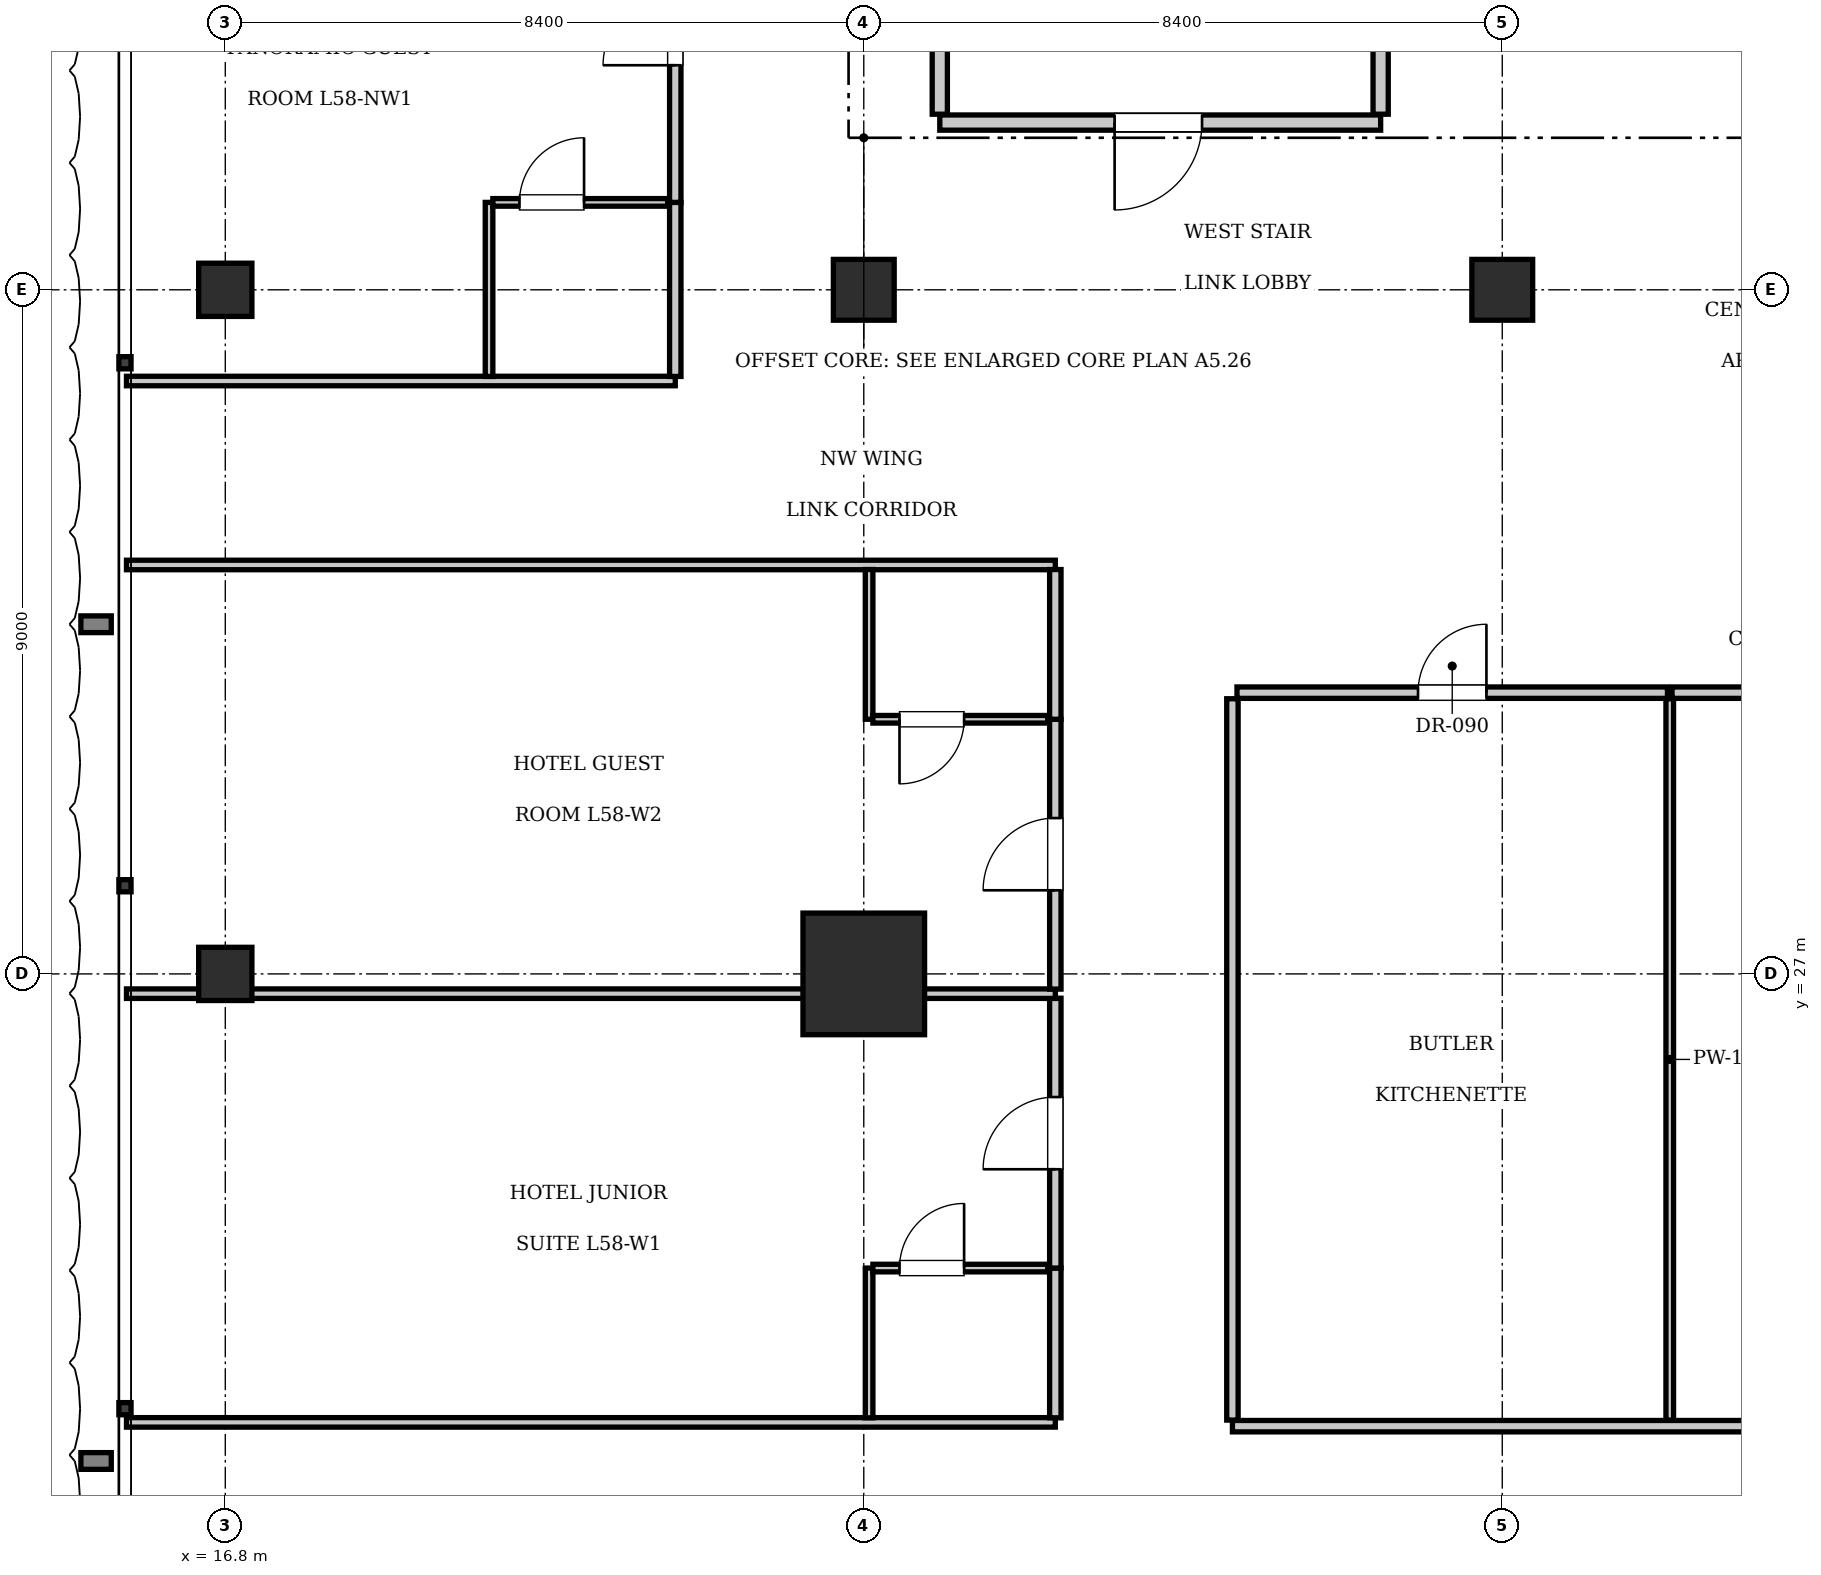
"""IFC4 building model, lengths in metres.
Left out: names, types, materials, properties, quantities, classifications, styles, units other than length and angle.
Written with IfcOpenShell. Run it as: python <this file> out.ifc"""

import sys

from ifc_helpers import new_model, si_unit, direction, frame, frame_2d, origin, origin_2d, place, context, subcontext, project, spatial, rectangle, extrude, element, fill, save


model = new_model("IFC4")
c1 = context("Model", 3, precision=1e-05, world=origin(), true_north=direction((0.0, 1.0)))
c2 = subcontext(c1, "Body", "Model", "MODEL_VIEW")
j1 = project(units=[si_unit("LENGTHUNIT", "METRE"), si_unit("PLANEANGLEUNIT", "RADIAN")], contexts=[c1])
p1 = place(None, origin())
s1 = spatial("IfcSite", under=j1, at=p1, CompositionType="ELEMENT")
p2 = place(p1, origin())
s2 = spatial("IfcBuilding", under=s1, at=p2, CompositionType="ELEMENT")
p3 = place(p2, frame((0.0, 0.0, 239.4)))
s3 = spatial("IfcBuildingStorey", under=s2, at=p3, CompositionType="ELEMENT", Elevation=239.4)
p4 = place(p3, frame((25.2, 27.0, 0.0), z_axis=(0.0, 0.0, 1.0), x_axis=(1.0, 0.0, 0.0)))
e1 = element("IfcColumn", 1, at=p4, inside=s3, PredefinedType="COLUMN", context=c2, shape_type="SweptSolid", body=[
    extrude(rectangle(XDim=1.6, YDim=1.6, at=origin_2d()), origin(), (0.0, 0.0, 1.0), 3.85),
])
for number, where, z_axis, x_axis in (
    (2, (25.2, 36.0, 0.0), (0.0, 0.0, 1.0), (1.0, 0.0, 0.0)),
    (3, (33.6, 36.0, 0.0), (0.0, 0.0, 1.0), (1.0, 0.0, 0.0)),
):
    element("IfcColumn", number, at=place(p3, frame(where, z_axis=z_axis, x_axis=x_axis)), inside=s3, PredefinedType="COLUMN", context=c2, shape_type="SweptSolid", body=[
        extrude(rectangle(XDim=0.8, YDim=0.8, at=origin_2d()), origin(), (0.0, 0.0, 1.0), 3.85),
    ])
for number, where, z_axis, x_axis in (
    (4, (16.8, 27.0, 0.0), (0.0, 0.0, 1.0), (1.0, 0.0, 0.0)),
    (5, (16.8, 36.0, 0.0), (0.0, 0.0, 1.0), (1.0, 0.0, 0.0)),
):
    element("IfcColumn", number, at=place(p3, frame(where, z_axis=z_axis, x_axis=x_axis)), inside=s3, PredefinedType="COLUMN", context=c2, shape_type="SweptSolid", body=[
        extrude(rectangle(XDim=0.7, YDim=0.7, at=origin_2d()), origin(), (0.0, 0.0, 1.0), 3.85),
    ])
p5 = place(p3, frame((26.2, 38.2, 0.0), z_axis=(0.0, 0.0, 1.0), x_axis=(1.0, 0.0, 0.0)))
e6 = element("IfcWall", 6, at=p5, inside=s3, PredefinedType="PARTITIONING", context=c2, shape_type="SweptSolid", body=[
    extrude(rectangle(XDim=5.8, YDim=0.2, at=frame_2d((2.9, 0.0))), origin(), (0.0, 0.0, 1.0), 3.61),
])
p6 = place(p5, frame((2.3, 0.0, 0.0)))
e7 = element("IfcOpeningElement", 7, at=p6, cuts=e6, PredefinedType="OPENING", context=c2, shape_type="SweptSolid", body=[
    extrude(rectangle(XDim=1.15, YDim=2.15, at=frame_2d((0.575, 1.075))), frame((0.0, 0.11, 0.0), z_axis=(0.0, -1.0, 0.0), x_axis=(1.0, 0.0, 0.0)), (0.0, 0.0, 1.0), 0.22),
])
for number, where, z_axis, x_axis in (
    (8, (26.2, 38.31, 0.0), (0.0, 0.0, 1.0), (0.0, 1.0, 0.0)),
    (9, (32.0, 38.31, 0.0), (0.0, 0.0, 1.0), (0.0, 1.0, 0.0)),
):
    element("IfcWall", number, at=place(p3, frame(where, z_axis=z_axis, x_axis=x_axis)), inside=s3, PredefinedType="PARTITIONING", context=c2, shape_type="SweptSolid", body=[
        extrude(rectangle(XDim=3.07, YDim=0.2, at=frame_2d((1.535, 0.0))), origin(), (0.0, 0.0, 1.0), 3.61),
    ])
p7 = place(p3, frame((30.05, 21.05, 0.0), z_axis=(0.0, 0.0, 1.0), x_axis=(1.0, 0.0, 0.0)))
e10 = element("IfcWall", 10, at=p7, inside=s3, PredefinedType="PARTITIONING", context=c2, shape_type="SweptSolid", body=[
    extrude(rectangle(XDim=15.55, YDim=0.15, at=frame_2d((7.775, 0.0))), origin(), (0.0, 0.0, 1.0), 3.61),
])
p8 = place(p3, frame((30.05, 21.13, 0.0), z_axis=(0.0, 0.0, 1.0), x_axis=(0.0, 1.0, 0.0)))
e11 = element("IfcWall", 11, at=p8, inside=s3, PredefinedType="PARTITIONING", context=c2, shape_type="SweptSolid", body=[
    extrude(rectangle(XDim=9.49, YDim=0.15, at=frame_2d((4.745, 0.0))), origin(), (0.0, 0.0, 1.0), 3.61),
])
p9 = place(p3, frame((30.11, 30.7, 0.0), z_axis=(0.0, 0.0, 1.0), x_axis=(1.0, 0.0, 0.0)))
e12 = element("IfcWall", 12, at=p9, inside=s3, PredefinedType="PARTITIONING", context=c2, shape_type="SweptSolid", body=[
    extrude(rectangle(XDim=5.663, YDim=0.15, at=frame_2d((2.832, 0.0))), origin(), (0.0, 0.0, 1.0), 3.61),
])
p10 = place(p9, frame((2.382, 0.0, 0.0)))
e13 = element("IfcOpeningElement", 13, at=p10, cuts=e12, PredefinedType="OPENING", context=c2, shape_type="SweptSolid", body=[
    extrude(rectangle(XDim=0.9, YDim=2.1, at=frame_2d((0.45, 1.05))), frame((0.0, 0.085, 0.0), z_axis=(0.0, -1.0, 0.0), x_axis=(1.0, 0.0, 0.0)), (0.0, 0.0, 1.0), 0.17),
])
p11 = place(p3, frame((35.803, 21.13, 0.0), z_axis=(0.0, 0.0, 1.0), x_axis=(0.0, 1.0, 0.0)))
e14 = element("IfcWall", 14, at=p11, inside=s3, PredefinedType="PARTITIONING", context=c2, shape_type="SweptSolid", body=[
    extrude(rectangle(XDim=9.49, YDim=0.1, at=frame_2d((4.745, 0.0))), origin(), (0.0, 0.0, 1.0), 3.61),
])
p12 = place(p3, frame((35.833, 30.7, 0.0), z_axis=(0.0, 0.0, 1.0), x_axis=(1.0, 0.0, 0.0)))
e15 = element("IfcWall", 15, at=p12, inside=s3, PredefinedType="PARTITIONING", context=c2, shape_type="SweptSolid", body=[
    extrude(rectangle(XDim=9.707, YDim=0.15, at=frame_2d((4.853, 0.0))), origin(), (0.0, 0.0, 1.0), 3.61),
])
p13 = place(p12, frame((4.403, 0.0, 0.0)))
e16 = element("IfcOpeningElement", 16, at=p13, cuts=e15, PredefinedType="OPENING", context=c2, shape_type="SweptSolid", body=[
    extrude(rectangle(XDim=0.9, YDim=2.1, at=frame_2d((0.45, 1.05))), frame((0.0, 0.085, 0.0), z_axis=(0.0, -1.0, 0.0), x_axis=(1.0, 0.0, 0.0)), (0.0, 0.0, 1.0), 0.17),
])
for number, where, z_axis, x_axis in (
    (17, (15.5, 21.1, 0.0), (0.0, 0.0, 1.0), (1.0, 0.0, 0.0)),
    (18, (15.5, 32.38, 0.0), (0.0, 0.0, 1.0), (1.0, 0.0, 0.0)),
):
    element("IfcWall", number, at=place(p3, frame(where, z_axis=z_axis, x_axis=x_axis)), inside=s3, PredefinedType="PARTITIONING", context=c2, shape_type="SweptSolid", body=[
        extrude(rectangle(XDim=12.22, YDim=0.125, at=frame_2d((6.11, 0.0))), origin(), (0.0, 0.0, 1.0), 3.61),
    ])
p14 = place(p3, frame((27.72, 21.16, 0.0), z_axis=(0.0, 0.0, 1.0), x_axis=(0.0, 1.0, 0.0)))
e19 = element("IfcWall", 19, at=p14, inside=s3, PredefinedType="PARTITIONING", context=c2, shape_type="SweptSolid", body=[
    extrude(rectangle(XDim=1.97, YDim=0.15, at=frame_2d((0.985, 0.0))), origin(), (0.0, 0.0, 1.0), 3.61),
])
p15 = place(p3, frame((27.72, 23.13, 0.0), z_axis=(0.0, 0.0, 1.0), x_axis=(0.0, 1.0, 0.0)))
e20 = element("IfcWall", 20, at=p15, inside=s3, PredefinedType="PARTITIONING", context=c2, shape_type="SweptSolid", body=[
    extrude(rectangle(XDim=3.55, YDim=0.15, at=frame_2d((1.775, 0.0))), origin(), (0.0, 0.0, 1.0), 3.61),
])
p16 = place(p15, frame((1.3, 0.0, 0.0)))
e21 = element("IfcOpeningElement", 21, at=p16, cuts=e20, PredefinedType="OPENING", context=c2, shape_type="SweptSolid", body=[
    extrude(rectangle(XDim=0.95, YDim=2.15, at=frame_2d((0.475, 1.075))), frame((0.0, 0.085, 0.0), z_axis=(0.0, -1.0, 0.0), x_axis=(1.0, 0.0, 0.0)), (0.0, 0.0, 1.0), 0.17),
])
p17 = place(p3, frame((25.27, 21.16, 0.0), z_axis=(0.0, 0.0, 1.0), x_axis=(0.0, 1.0, 0.0)))
e22 = element("IfcWall", 22, at=p17, inside=s3, PredefinedType="PARTITIONING", context=c2, shape_type="SweptSolid", body=[
    extrude(rectangle(XDim=1.97, YDim=0.1, at=frame_2d((0.985, 0.0))), origin(), (0.0, 0.0, 1.0), 3.077),
])
p18 = place(p3, frame((25.32, 23.13, 0.0), z_axis=(0.0, 0.0, 1.0), x_axis=(1.0, 0.0, 0.0)))
e23 = element("IfcWall", 23, at=p18, inside=s3, PredefinedType="PARTITIONING", context=c2, shape_type="SweptSolid", body=[
    extrude(rectangle(XDim=2.3, YDim=0.1, at=frame_2d((1.15, 0.0))), origin(), (0.0, 0.0, 1.0), 3.61),
])
p19 = place(p18, frame((0.35, 0.0, 0.0)))
e24 = element("IfcOpeningElement", 24, at=p19, cuts=e23, PredefinedType="OPENING", context=c2, shape_type="SweptSolid", body=[
    extrude(rectangle(XDim=0.85, YDim=2.1, at=frame_2d((0.425, 1.05))), frame((0.0, 0.06, 0.0), z_axis=(0.0, -1.0, 0.0), x_axis=(1.0, 0.0, 0.0)), (0.0, 0.0, 1.0), 0.12),
])
p20 = place(p3, frame((15.5, 26.74, 0.0), z_axis=(0.0, 0.0, 1.0), x_axis=(1.0, 0.0, 0.0)))
e25 = element("IfcWall", 25, at=p20, inside=s3, PredefinedType="PARTITIONING", context=c2, shape_type="SweptSolid", body=[
    extrude(rectangle(XDim=12.22, YDim=0.125, at=frame_2d((6.11, 0.0))), origin(), (0.0, 0.0, 1.0), 2.41),
])
p21 = place(p3, frame((27.72, 26.8, 0.0), z_axis=(0.0, 0.0, 1.0), x_axis=(0.0, 1.0, 0.0)))
e26 = element("IfcWall", 26, at=p21, inside=s3, PredefinedType="PARTITIONING", context=c2, shape_type="SweptSolid", body=[
    extrude(rectangle(XDim=3.55, YDim=0.15, at=frame_2d((1.775, 0.0))), origin(), (0.0, 0.0, 1.0), 3.61),
])
p22 = place(p21, frame((1.3, 0.0, 0.0)))
e27 = element("IfcOpeningElement", 27, at=p22, cuts=e26, PredefinedType="OPENING", context=c2, shape_type="SweptSolid", body=[
    extrude(rectangle(XDim=0.95, YDim=2.15, at=frame_2d((0.475, 1.075))), frame((0.0, 0.085, 0.0), z_axis=(0.0, -1.0, 0.0), x_axis=(1.0, 0.0, 0.0)), (0.0, 0.0, 1.0), 0.17),
])
p23 = place(p3, frame((27.72, 30.35, 0.0), z_axis=(0.0, 0.0, 1.0), x_axis=(0.0, 1.0, 0.0)))
e28 = element("IfcWall", 28, at=p23, inside=s3, PredefinedType="PARTITIONING", context=c2, shape_type="SweptSolid", body=[
    extrude(rectangle(XDim=1.97, YDim=0.15, at=frame_2d((0.985, 0.0))), origin(), (0.0, 0.0, 1.0), 3.61),
])
p24 = place(p3, frame((25.27, 30.35, 0.0), z_axis=(0.0, 0.0, 1.0), x_axis=(0.0, 1.0, 0.0)))
e29 = element("IfcWall", 29, at=p24, inside=s3, PredefinedType="PARTITIONING", context=c2, shape_type="SweptSolid", body=[
    extrude(rectangle(XDim=1.97, YDim=0.1, at=frame_2d((0.985, 0.0))), origin(), (0.0, 0.0, 1.0), 3.077),
])
p25 = place(p3, frame((25.32, 30.35, 0.0), z_axis=(0.0, 0.0, 1.0), x_axis=(1.0, 0.0, 0.0)))
e30 = element("IfcWall", 30, at=p25, inside=s3, PredefinedType="PARTITIONING", context=c2, shape_type="SweptSolid", body=[
    extrude(rectangle(XDim=2.3, YDim=0.1, at=frame_2d((1.15, 0.0))), origin(), (0.0, 0.0, 1.0), 3.61),
])
p26 = place(p25, frame((0.35, 0.0, 0.0)))
e31 = element("IfcOpeningElement", 31, at=p26, cuts=e30, PredefinedType="OPENING", context=c2, shape_type="SweptSolid", body=[
    extrude(rectangle(XDim=0.85, YDim=2.1, at=frame_2d((0.425, 1.05))), frame((0.0, 0.06, 0.0), z_axis=(0.0, -1.0, 0.0), x_axis=(1.0, 0.0, 0.0)), (0.0, 0.0, 1.0), 0.12),
])
p27 = place(p3, frame((15.5, 34.8, 0.0), z_axis=(0.0, 0.0, 1.0), x_axis=(1.0, 0.0, 0.0)))
e32 = element("IfcWall", 32, at=p27, inside=s3, PredefinedType="PARTITIONING", context=c2, shape_type="SweptSolid", body=[
    extrude(rectangle(XDim=7.22, YDim=0.125, at=frame_2d((3.61, 0.0))), origin(), (0.0, 0.0, 1.0), 3.61),
])
p28 = place(p3, frame((22.72, 34.86, 0.0), z_axis=(0.0, 0.0, 1.0), x_axis=(0.0, 1.0, 0.0)))
e33 = element("IfcWall", 33, at=p28, inside=s3, PredefinedType="PARTITIONING", context=c2, shape_type="SweptSolid", body=[
    extrude(rectangle(XDim=2.29, YDim=0.15, at=frame_2d((1.145, 0.0))), origin(), (0.0, 0.0, 1.0), 3.61),
])
p29 = place(p3, frame((22.72, 37.15, 0.0), z_axis=(0.0, 0.0, 1.0), x_axis=(0.0, 1.0, 0.0)))
e34 = element("IfcWall", 34, at=p29, inside=s3, PredefinedType="PARTITIONING", context=c2, shape_type="SweptSolid", body=[
    extrude(rectangle(XDim=4.559, YDim=0.15, at=frame_2d((2.279, 0.0))), origin(), (0.0, 0.0, 1.0), 3.61),
])
p30 = place(p29, frame((1.804, 0.0, 0.0)))
e35 = element("IfcOpeningElement", 35, at=p30, cuts=e34, PredefinedType="OPENING", context=c2, shape_type="SweptSolid", body=[
    extrude(rectangle(XDim=0.95, YDim=2.15, at=frame_2d((0.475, 1.075))), frame((0.0, 0.085, 0.0), z_axis=(0.0, -1.0, 0.0), x_axis=(1.0, 0.0, 0.0)), (0.0, 0.0, 1.0), 0.17),
])
p31 = place(p3, frame((20.27, 34.86, 0.0), z_axis=(0.0, 0.0, 1.0), x_axis=(0.0, 1.0, 0.0)))
e36 = element("IfcWall", 36, at=p31, inside=s3, PredefinedType="PARTITIONING", context=c2, shape_type="SweptSolid", body=[
    extrude(rectangle(XDim=2.29, YDim=0.1, at=frame_2d((1.145, 0.0))), origin(), (0.0, 0.0, 1.0), 3.61),
])
p32 = place(p3, frame((20.32, 37.15, 0.0), z_axis=(0.0, 0.0, 1.0), x_axis=(1.0, 0.0, 0.0)))
e37 = element("IfcWall", 37, at=p32, inside=s3, PredefinedType="PARTITIONING", context=c2, shape_type="SweptSolid", body=[
    extrude(rectangle(XDim=2.3, YDim=0.1, at=frame_2d((1.15, 0.0))), origin(), (0.0, 0.0, 1.0), 3.61),
])
p33 = place(p32, frame((0.35, 0.0, 0.0)))
e38 = element("IfcOpeningElement", 38, at=p33, cuts=e37, PredefinedType="OPENING", context=c2, shape_type="SweptSolid", body=[
    extrude(rectangle(XDim=0.85, YDim=2.1, at=frame_2d((0.425, 1.05))), frame((0.0, 0.06, 0.0), z_axis=(0.0, -1.0, 0.0), x_axis=(1.0, 0.0, 0.0)), (0.0, 0.0, 1.0), 0.12),
])
p34 = place(p6, frame((1.15, 0.0, 0.0), z_axis=(0.0, 0.0, 1.0), x_axis=(-1.0, 0.0, 0.0)))
e39 = element("IfcDoor", 39, at=p34, inside=s3, OperationType="SINGLE_SWING_RIGHT", PredefinedType="DOOR", context=c2, shape_type="SweptSolid", body=[
    extrude(rectangle(XDim=1.15, YDim=2.15, at=frame_2d((0.575, 1.075))), frame((0.0, 0.025, 0.0), z_axis=(0.0, -1.0, 0.0), x_axis=(1.0, 0.0, 0.0)), (0.0, 0.0, 1.0), 0.05),
])
fill(e7, e39)
p35 = place(p10, origin())
e40 = element("IfcDoor", 40, at=p35, inside=s3, OperationType="SINGLE_SWING_RIGHT", PredefinedType="DOOR", context=c2, shape_type="SweptSolid", body=[
    extrude(rectangle(XDim=0.9, YDim=2.1, at=frame_2d((0.45, 1.05))), frame((0.0, 0.025, 0.0), z_axis=(0.0, -1.0, 0.0), x_axis=(1.0, 0.0, 0.0)), (0.0, 0.0, 1.0), 0.05),
])
fill(e13, e40)
p36 = place(p19, origin())
e41 = element("IfcDoor", 41, at=p36, inside=s3, OperationType="SINGLE_SWING_RIGHT", PredefinedType="DOOR", context=c2, shape_type="SweptSolid", body=[
    extrude(rectangle(XDim=0.85, YDim=2.1, at=frame_2d((0.425, 1.05))), frame((0.0, 0.025, 0.0), z_axis=(0.0, -1.0, 0.0), x_axis=(1.0, 0.0, 0.0)), (0.0, 0.0, 1.0), 0.05),
])
fill(e24, e41)
p37 = place(p16, origin())
e42 = element("IfcDoor", 42, at=p37, inside=s3, OperationType="SINGLE_SWING_LEFT", PredefinedType="DOOR", context=c2, shape_type="SweptSolid", body=[
    extrude(rectangle(XDim=0.95, YDim=2.15, at=frame_2d((0.475, 1.075))), frame((0.0, 0.025, 0.0), z_axis=(0.0, -1.0, 0.0), x_axis=(1.0, 0.0, 0.0)), (0.0, 0.0, 1.0), 0.05),
])
fill(e21, e42)
p38 = place(p26, frame((0.85, 0.0, 0.0), z_axis=(0.0, 0.0, 1.0), x_axis=(-1.0, 0.0, 0.0)))
e43 = element("IfcDoor", 43, at=p38, inside=s3, OperationType="SINGLE_SWING_RIGHT", PredefinedType="DOOR", context=c2, shape_type="SweptSolid", body=[
    extrude(rectangle(XDim=0.85, YDim=2.1, at=frame_2d((0.425, 1.05))), frame((0.0, 0.025, 0.0), z_axis=(0.0, -1.0, 0.0), x_axis=(1.0, 0.0, 0.0)), (0.0, 0.0, 1.0), 0.05),
])
fill(e31, e43)
p39 = place(p22, origin())
e44 = element("IfcDoor", 44, at=p39, inside=s3, OperationType="SINGLE_SWING_LEFT", PredefinedType="DOOR", context=c2, shape_type="SweptSolid", body=[
    extrude(rectangle(XDim=0.95, YDim=2.15, at=frame_2d((0.475, 1.075))), frame((0.0, 0.025, 0.0), z_axis=(0.0, -1.0, 0.0), x_axis=(1.0, 0.0, 0.0)), (0.0, 0.0, 1.0), 0.05),
])
fill(e27, e44)
p40 = place(p33, origin())
e45 = element("IfcDoor", 45, at=p40, inside=s3, OperationType="SINGLE_SWING_RIGHT", PredefinedType="DOOR", context=c2, shape_type="SweptSolid", body=[
    extrude(rectangle(XDim=0.85, YDim=2.1, at=frame_2d((0.425, 1.05))), frame((0.0, 0.025, 0.0), z_axis=(0.0, -1.0, 0.0), x_axis=(1.0, 0.0, 0.0)), (0.0, 0.0, 1.0), 0.05),
])
fill(e38, e45)
p41 = place(p30, origin())
e46 = element("IfcDoor", 46, at=p41, inside=s3, OperationType="SINGLE_SWING_LEFT", PredefinedType="DOOR", context=c2, shape_type="SweptSolid", body=[
    extrude(rectangle(XDim=0.95, YDim=2.15, at=frame_2d((0.475, 1.075))), frame((0.0, 0.025, 0.0), z_axis=(0.0, -1.0, 0.0), x_axis=(1.0, 0.0, 0.0)), (0.0, 0.0, 1.0), 0.05),
])
fill(e35, e46)
save(model, sys.argv[1])
